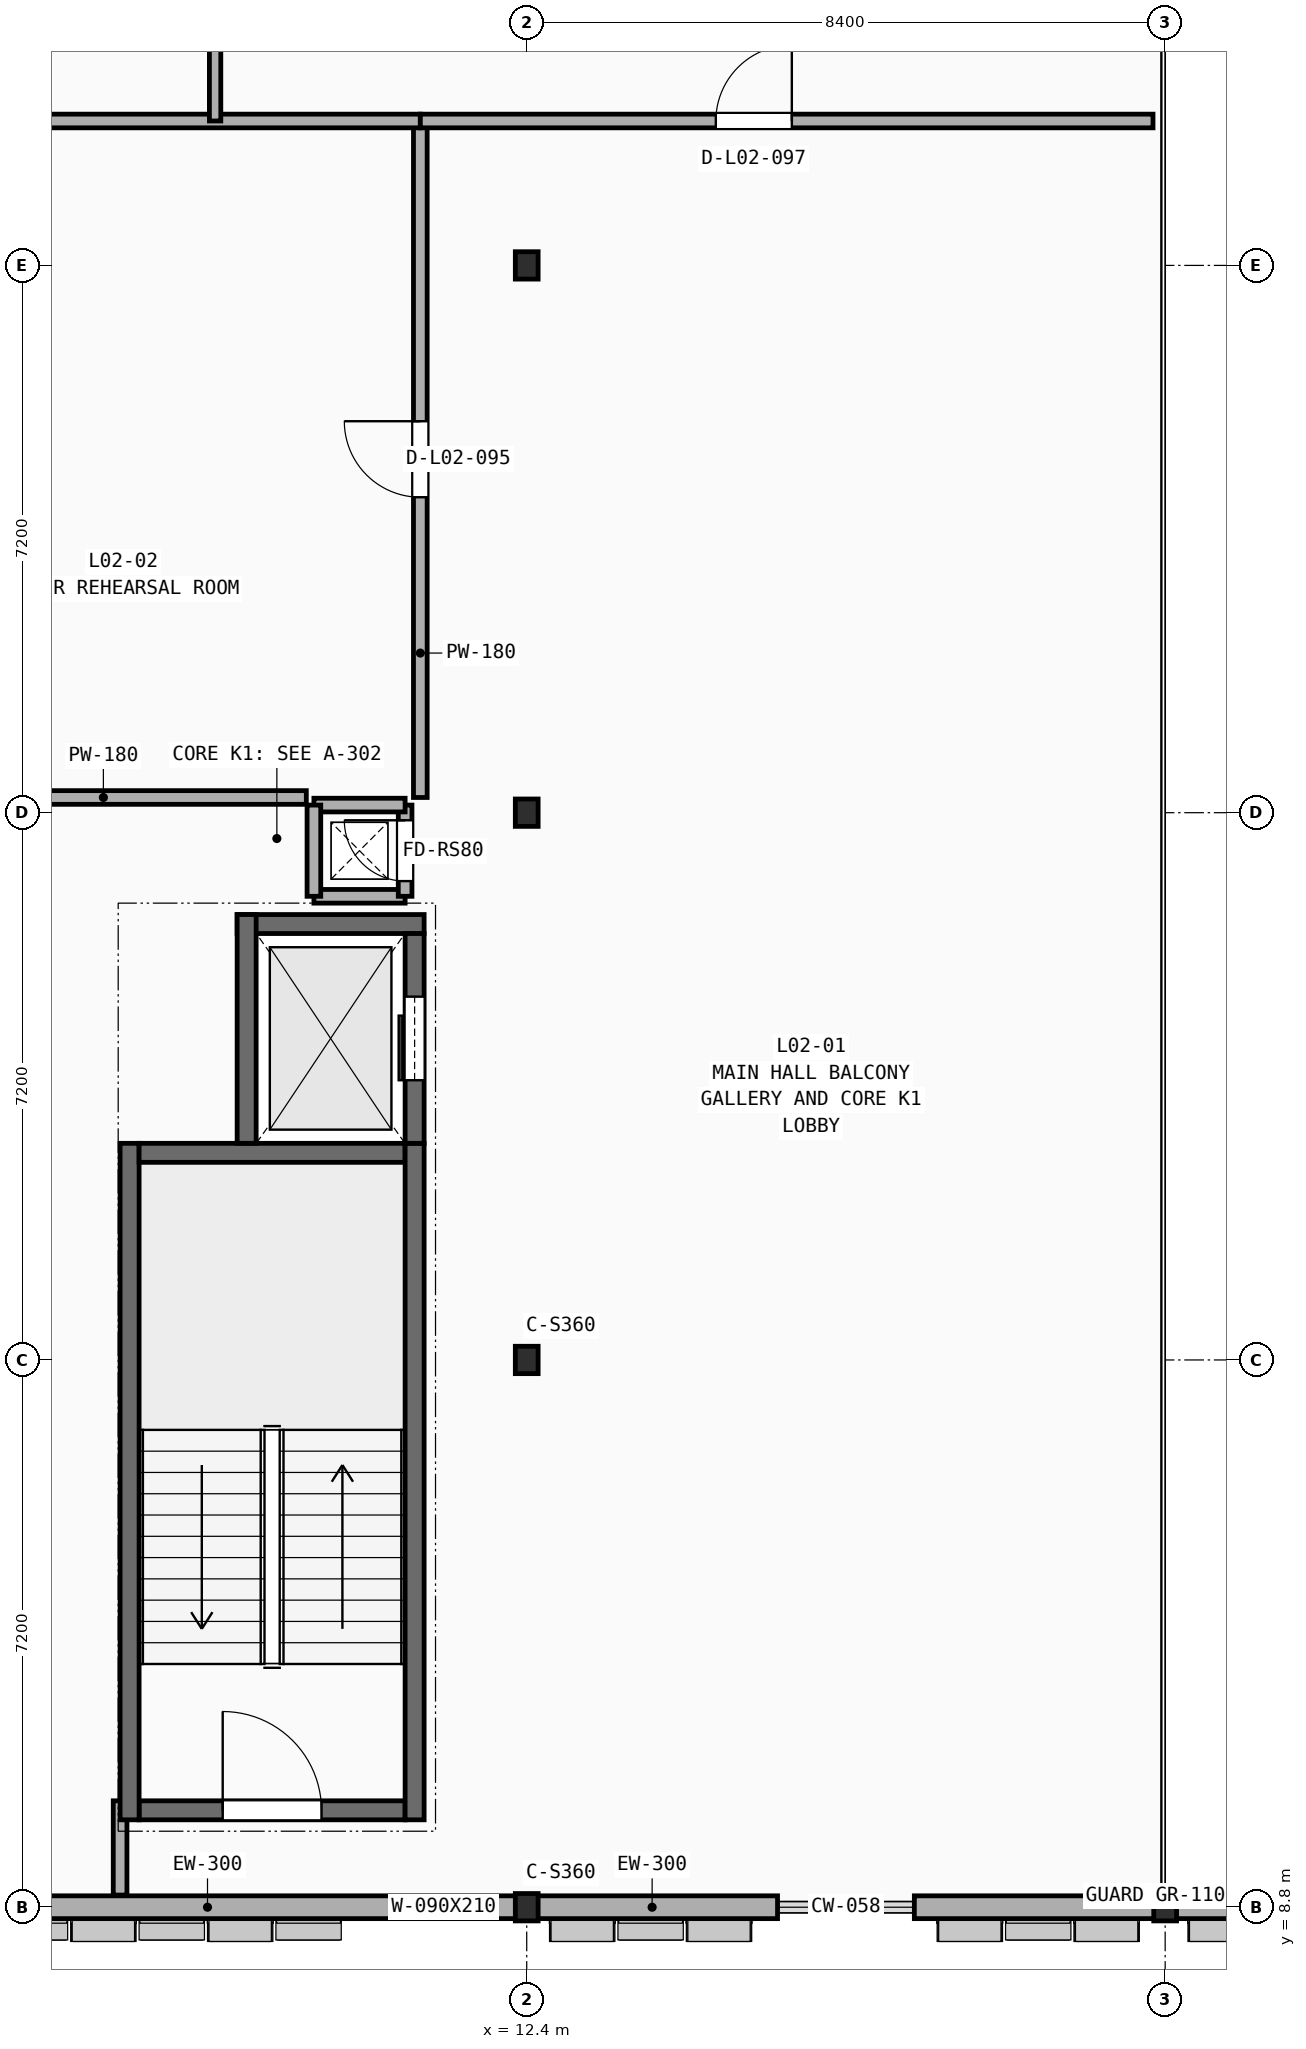
"""IFC4 building model, lengths in metres.
Left out: names, types, materials, properties, quantities, classifications, styles, units other than length and angle.
Written with IfcOpenShell. Run it as: python <this file> out.ifc"""

import sys

from ifc_helpers import new_model, si_unit, direction, frame, frame_2d, origin, origin_2d, place, context, subcontext, project, spatial, rectangle, i_section, extrude, element, fill, save


model = new_model("IFC4")
c1 = context("Model", 3, precision=1e-05, world=origin(), true_north=direction((0.0, 1.0)))
c2 = subcontext(c1, "Body", "Model", "MODEL_VIEW")
j1 = project(units=[si_unit("LENGTHUNIT", "METRE"), si_unit("PLANEANGLEUNIT", "RADIAN")], contexts=[c1])
p1 = place(None, origin())
s1 = spatial("IfcSite", under=j1, at=p1, CompositionType="ELEMENT")
p2 = place(p1, origin())
s2 = spatial("IfcBuilding", under=s1, at=p2, CompositionType="ELEMENT")
p3 = place(p2, frame((0.0, 0.0, 9.6)))
s3 = spatial("IfcBuildingStorey", under=s2, at=p3, CompositionType="ELEMENT", Elevation=9.6)
for number, where, z_axis, x_axis in (
    (1, (12.4, 8.8, 0.0), (0.0, 0.0, 1.0), (1.0, 0.0, 0.0)),
    (2, (12.4, 16.0, 0.0), (0.0, 0.0, 1.0), (1.0, 0.0, 0.0)),
    (3, (12.4, 23.2, 0.0), (0.0, 0.0, 1.0), (1.0, 0.0, 0.0)),
    (4, (12.4, 30.4, 0.0), (0.0, 0.0, 1.0), (1.0, 0.0, 0.0)),
    (5, (20.8, 8.8, 0.0), (0.0, 0.0, 1.0), (1.0, 0.0, 0.0)),
):
    element("IfcColumn", number, at=place(p3, frame(where, z_axis=z_axis, x_axis=x_axis)), inside=s3, PredefinedType="COLUMN", context=c2, shape_type="SweptSolid", body=[
        extrude(i_section(OverallWidth=0.3, OverallDepth=0.36, WebThickness=0.012, FlangeThickness=0.022, at=origin_2d()), origin(), (0.0, 0.0, 1.0), 4.2),
    ])
p4 = place(p3, frame((7.05, 8.96, 0.0), z_axis=(0.0, 0.0, 1.0), x_axis=(0.0, 1.0, 0.0)))
e6 = element("IfcWall", 6, at=p4, inside=s3, PredefinedType="PARTITIONING", context=c2, shape_type="SweptSolid", body=[
    extrude(rectangle(XDim=1.24, YDim=0.18, at=frame_2d((0.62, 0.0))), origin(), (0.0, 0.0, 1.0), 3.63),
])
p5 = place(p3, frame((4.16, 23.4, 0.0), z_axis=(0.0, 0.0, 1.0), x_axis=(1.0, 0.0, 0.0)))
e7 = element("IfcWall", 7, at=p5, inside=s3, PredefinedType="PARTITIONING", context=c2, shape_type="SweptSolid", body=[
    extrude(rectangle(XDim=5.34, YDim=0.18, at=frame_2d((2.67, 0.0))), origin(), (0.0, 0.0, 1.0), 3.63),
])
p6 = place(p3, frame((11.0, 23.4, 0.0), z_axis=(0.0, 0.0, 1.0), x_axis=(0.0, 1.0, 0.0)))
e8 = element("IfcWall", 8, at=p6, inside=s3, PredefinedType="PARTITIONING", context=c2, shape_type="SweptSolid", body=[
    extrude(rectangle(XDim=8.9, YDim=0.18, at=frame_2d((4.45, 0.0))), origin(), (0.0, 0.0, 1.0), 3.27),
])
p7 = place(p6, frame((3.95, 0.0, -0.01)))
e9 = element("IfcOpeningElement", 9, at=p7, cuts=e8, PredefinedType="OPENING", context=c2, shape_type="SweptSolid", body=[
    extrude(rectangle(XDim=1.0, YDim=2.16, at=frame_2d((0.5, 1.08))), frame((0.0, 0.1, 0.0), z_axis=(0.0, -1.0, 0.0), x_axis=(1.0, 0.0, 0.0)), (0.0, 0.0, 1.0), 0.2),
])
p8 = place(p3, frame((4.16, 32.3, 0.0), z_axis=(0.0, 0.0, 1.0), x_axis=(1.0, 0.0, 0.0)))
e10 = element("IfcWall", 10, at=p8, inside=s3, PredefinedType="PARTITIONING", context=c2, shape_type="SweptSolid", body=[
    extrude(rectangle(XDim=6.84, YDim=0.18, at=frame_2d((3.42, 0.0))), origin(), (0.0, 0.0, 1.0), 3.59),
])
p9 = place(p3, frame((8.3, 32.3, 0.0), z_axis=(0.0, 0.0, 1.0), x_axis=(0.0, 1.0, 0.0)))
e11 = element("IfcWall", 11, at=p9, inside=s3, PredefinedType="PARTITIONING", context=c2, shape_type="SweptSolid", body=[
    extrude(rectangle(XDim=5.16, YDim=0.15, at=frame_2d((2.58, 0.0))), origin(), (0.0, 0.0, 1.0), 3.63),
])
p10 = place(p9, frame((2.105, 0.0, -0.01)))
e12 = element("IfcOpeningElement", 12, at=p10, cuts=e11, PredefinedType="OPENING", context=c2, shape_type="SweptSolid", body=[
    extrude(rectangle(XDim=0.95, YDim=2.16, at=frame_2d((0.475, 1.08))), frame((0.0, 0.085, 0.0), z_axis=(0.0, -1.0, 0.0), x_axis=(1.0, 0.0, 0.0)), (0.0, 0.0, 1.0), 0.17),
])
p11 = place(p3, frame((11.0, 32.3, 0.0), z_axis=(0.0, 0.0, 1.0), x_axis=(1.0, 0.0, 0.0)))
e13 = element("IfcWall", 13, at=p11, inside=s3, PredefinedType="PARTITIONING", context=c2, shape_type="SweptSolid", body=[
    extrude(rectangle(XDim=9.64, YDim=0.18, at=frame_2d((4.82, 0.0))), origin(), (0.0, 0.0, 1.0), 3.63),
])
p12 = place(p11, frame((3.888, 0.0, -0.01)))
e14 = element("IfcOpeningElement", 14, at=p12, cuts=e13, PredefinedType="OPENING", context=c2, shape_type="SweptSolid", body=[
    extrude(rectangle(XDim=1.0, YDim=2.16, at=frame_2d((0.5, 1.08))), frame((0.0, 0.1, 0.0), z_axis=(0.0, -1.0, 0.0), x_axis=(1.0, 0.0, 0.0)), (0.0, 0.0, 1.0), 0.2),
])
p13 = place(p3, frame((4.0, 8.8, 0.0), z_axis=(0.0, 0.0, 1.0), x_axis=(1.0, 0.0, 0.0)))
e15 = element("IfcWall", 15, at=p13, inside=s3, PredefinedType="SOLIDWALL", context=c2, shape_type="SweptSolid", body=[
    extrude(rectangle(XDim=8.4, YDim=0.3, at=frame_2d((4.2, 0.0))), origin(), (0.0, 0.0, 1.0), 3.63),
])
p14 = place(p13, frame((0.46, 0.0, 0.85)))
e16 = element("IfcOpeningElement", 16, at=p14, cuts=e15, PredefinedType="OPENING", context=c2, shape_type="SweptSolid", body=[
    extrude(rectangle(XDim=0.9, YDim=2.1, at=frame_2d((0.45, 1.05))), frame((0.0, 0.16, 0.0), z_axis=(0.0, -1.0, 0.0), x_axis=(1.0, 0.0, 0.0)), (0.0, 0.0, 1.0), 0.32),
])
p15 = place(p13, frame((6.86, 0.0, 0.85)))
e17 = element("IfcOpeningElement", 17, at=p15, cuts=e15, PredefinedType="OPENING", context=c2, shape_type="SweptSolid", body=[
    extrude(rectangle(XDim=0.9, YDim=2.1, at=frame_2d((0.45, 1.05))), frame((0.0, 0.16, 0.0), z_axis=(0.0, -1.0, 0.0), x_axis=(1.0, 0.0, 0.0)), (0.0, 0.0, 1.0), 0.32),
])
for number, where, z_axis, x_axis in (
    (18, (12.4, 8.8, 0.0), (0.0, 0.0, 1.0), (1.0, 0.0, 0.0)),
    (19, (17.5, 8.8, 0.0), (0.0, 0.0, 1.0), (1.0, 0.0, 0.0)),
    (20, (20.8, 8.8, 0.0), (0.0, 0.0, 1.0), (1.0, 0.0, 0.0)),
):
    element("IfcWall", number, at=place(p3, frame(where, z_axis=z_axis, x_axis=x_axis)), inside=s3, PredefinedType="SOLIDWALL", context=c2, shape_type="SweptSolid", body=[
        extrude(rectangle(XDim=3.3, YDim=0.3, at=frame_2d((1.65, 0.0))), origin(), (0.0, 0.0, 1.0), 4.2),
    ])
p16 = place(p3, frame((7.3, 10.075, 0.0), z_axis=(0.0, 0.0, 1.0), x_axis=(1.0, 0.0, 0.0)))
e21 = element("IfcWall", 21, at=p16, inside=s3, PredefinedType="SHEAR", context=c2, shape_type="SweptSolid", body=[
    extrude(rectangle(XDim=3.5, YDim=0.25, at=frame_2d((1.75, 0.0))), origin(), (0.0, 0.0, 1.0), 4.2),
])
p17 = place(p16, frame((1.1, 0.0, -0.01)))
e22 = element("IfcOpeningElement", 22, at=p17, cuts=e21, PredefinedType="OPENING", context=c2, shape_type="SweptSolid", body=[
    extrude(rectangle(XDim=1.3, YDim=2.16, at=frame_2d((0.65, 1.08))), frame((0.0, 0.135, 0.0), z_axis=(0.0, -1.0, 0.0), x_axis=(1.0, 0.0, 0.0)), (0.0, 0.0, 1.0), 0.27),
])
p18 = place(p3, frame((7.175, 9.95, 0.0), z_axis=(0.0, 0.0, 1.0), x_axis=(0.0, 1.0, 0.0)))
e23 = element("IfcWall", 23, at=p18, inside=s3, PredefinedType="SHEAR", context=c2, shape_type="SweptSolid", body=[
    extrude(rectangle(XDim=8.9, YDim=0.25, at=frame_2d((4.45, 0.0))), origin(), (0.0, 0.0, 1.0), 4.2),
])
p19 = place(p3, frame((10.8, 18.725, 0.0), z_axis=(0.0, 0.0, 1.0), x_axis=(-1.0, 0.0, 0.0)))
e24 = element("IfcWall", 24, at=p19, inside=s3, PredefinedType="SHEAR", context=c2, shape_type="SweptSolid", body=[
    extrude(rectangle(XDim=3.5, YDim=0.25, at=frame_2d((1.75, 0.0))), origin(), (0.0, 0.0, 1.0), 4.2),
])
p20 = place(p3, frame((10.925, 9.95, 0.0), z_axis=(0.0, 0.0, 1.0), x_axis=(0.0, 1.0, 0.0)))
e25 = element("IfcWall", 25, at=p20, inside=s3, PredefinedType="SHEAR", context=c2, shape_type="SweptSolid", body=[
    extrude(rectangle(XDim=8.9, YDim=0.25, at=frame_2d((4.45, 0.0))), origin(), (0.0, 0.0, 1.0), 4.2),
])
p21 = place(p3, frame((8.59, 21.735, 0.0), z_axis=(0.0, 0.0, 1.0), x_axis=(1.0, 0.0, 0.0)))
e26 = element("IfcWall", 26, at=p21, inside=s3, PredefinedType="SHEAR", context=c2, shape_type="SweptSolid", body=[
    extrude(rectangle(XDim=2.46, YDim=0.25, at=frame_2d((1.23, 0.0))), origin(), (0.0, 0.0, 1.0), 4.2),
])
p22 = place(p3, frame((10.925, 18.85, 0.0), z_axis=(0.0, 0.0, 1.0), x_axis=(0.0, 1.0, 0.0)))
e27 = element("IfcWall", 27, at=p22, inside=s3, PredefinedType="SHEAR", context=c2, shape_type="SweptSolid", body=[
    extrude(rectangle(XDim=2.76, YDim=0.25, at=frame_2d((1.38, 0.0))), origin(), (0.0, 0.0, 1.0), 4.2),
])
p23 = place(p22, frame((0.83, 0.0, -0.01)))
e28 = element("IfcOpeningElement", 28, at=p23, cuts=e27, PredefinedType="OPENING", context=c2, shape_type="SweptSolid", body=[
    extrude(rectangle(XDim=1.1, YDim=2.16, at=frame_2d((0.55, 1.08))), frame((0.0, 0.135, 0.0), z_axis=(0.0, -1.0, 0.0), x_axis=(1.0, 0.0, 0.0)), (0.0, 0.0, 1.0), 0.27),
])
p24 = place(p3, frame((8.715, 18.85, 0.0), z_axis=(0.0, 0.0, 1.0), x_axis=(0.0, 1.0, 0.0)))
e29 = element("IfcWall", 29, at=p24, inside=s3, PredefinedType="SHEAR", context=c2, shape_type="SweptSolid", body=[
    extrude(rectangle(XDim=3.01, YDim=0.25, at=frame_2d((1.505, 0.0))), origin(), (0.0, 0.0, 1.0), 4.2),
])
p25 = place(p3, frame((9.6, 22.1, 0.0), z_axis=(0.0, 0.0, 1.0), x_axis=(1.0, 0.0, 0.0)))
e30 = element("IfcWall", 30, at=p25, inside=s3, PredefinedType="SOLIDWALL", context=c2, shape_type="SweptSolid", body=[
    extrude(rectangle(XDim=1.2, YDim=0.18, at=frame_2d((0.6, 0.0))), origin(), (0.0, 0.0, 1.0), 3.97),
])
p26 = place(p3, frame((10.8, 22.1, 0.0), z_axis=(0.0, 0.0, 1.0), x_axis=(0.0, 1.0, 0.0)))
e31 = element("IfcWall", 31, at=p26, inside=s3, PredefinedType="SOLIDWALL", context=c2, shape_type="SweptSolid", body=[
    extrude(rectangle(XDim=1.2, YDim=0.18, at=frame_2d((0.6, 0.0))), origin(), (0.0, 0.0, 1.0), 3.97),
])
p27 = place(p26, frame((0.2, 0.0, -0.01)))
e32 = element("IfcOpeningElement", 32, at=p27, cuts=e31, PredefinedType="OPENING", context=c2, shape_type="SweptSolid", body=[
    extrude(rectangle(XDim=0.8, YDim=2.06, at=frame_2d((0.4, 1.03))), frame((0.0, 0.1, 0.0), z_axis=(0.0, -1.0, 0.0), x_axis=(1.0, 0.0, 0.0)), (0.0, 0.0, 1.0), 0.2),
])
for number, where, z_axis, x_axis in (
    (33, (10.8, 23.3, 0.0), (0.0, 0.0, 1.0), (-1.0, 0.0, 0.0)),
    (34, (9.6, 23.3, 0.0), (0.0, 0.0, 1.0), (0.0, -1.0, 0.0)),
):
    element("IfcWall", number, at=place(p3, frame(where, z_axis=z_axis, x_axis=x_axis)), inside=s3, PredefinedType="SOLIDWALL", context=c2, shape_type="SweptSolid", body=[
        extrude(rectangle(XDim=1.2, YDim=0.18, at=frame_2d((0.6, 0.0))), origin(), (0.0, 0.0, 1.0), 3.97),
    ])
p28 = place(p7, frame((0.0, 0.0, 0.01)))
e35 = element("IfcDoor", 35, at=p28, inside=s3, OperationType="SINGLE_SWING_RIGHT", PredefinedType="DOOR", context=c2, shape_type="SweptSolid", body=[
    extrude(rectangle(XDim=1.0, YDim=2.15, at=frame_2d((0.5, 1.075))), frame((0.0, 0.025, 0.0), z_axis=(0.0, -1.0, 0.0), x_axis=(1.0, 0.0, 0.0)), (0.0, 0.0, 1.0), 0.05),
])
fill(e9, e35)
p29 = place(p12, frame((0.0, 0.0, 0.01)))
e36 = element("IfcDoor", 36, at=p29, inside=s3, OperationType="SINGLE_SWING_RIGHT", PredefinedType="DOOR", context=c2, shape_type="SweptSolid", body=[
    extrude(rectangle(XDim=1.0, YDim=2.15, at=frame_2d((0.5, 1.075))), frame((0.0, 0.025, 0.0), z_axis=(0.0, -1.0, 0.0), x_axis=(1.0, 0.0, 0.0)), (0.0, 0.0, 1.0), 0.05),
])
fill(e14, e36)
p30 = place(p15, origin())
e37 = element("IfcWindow", 37, at=p30, inside=s3, PartitioningType="SINGLE_PANEL", PredefinedType="WINDOW", context=c2, shape_type="SweptSolid", body=[
    extrude(rectangle(XDim=0.9, YDim=2.1, at=frame_2d((0.45, 1.05))), frame((0.0, 0.03, 0.0), z_axis=(0.0, -1.0, 0.0), x_axis=(1.0, 0.0, 0.0)), (0.0, 0.0, 1.0), 0.06),
])
fill(e17, e37)
p31 = place(p17, frame((1.3, 0.0, 0.01), z_axis=(0.0, 0.0, 1.0), x_axis=(-1.0, 0.0, 0.0)))
e38 = element("IfcDoor", 38, at=p31, inside=s3, OperationType="SINGLE_SWING_LEFT", PredefinedType="DOOR", context=c2, shape_type="SweptSolid", body=[
    extrude(rectangle(XDim=1.3, YDim=2.15, at=frame_2d((0.65, 1.075))), frame((0.0, 0.025, 0.0), z_axis=(0.0, -1.0, 0.0), x_axis=(1.0, 0.0, 0.0)), (0.0, 0.0, 1.0), 0.05),
])
fill(e22, e38)
p32 = place(p23, frame((0.0, 0.0, 0.01)))
e39 = element("IfcDoor", 39, at=p32, inside=s3, OperationType="SLIDING_TO_LEFT", PredefinedType="DOOR", context=c2, shape_type="SweptSolid", body=[
    extrude(rectangle(XDim=1.1, YDim=2.15, at=frame_2d((0.55, 1.075))), frame((0.0, 0.025, 0.0), z_axis=(0.0, -1.0, 0.0), x_axis=(1.0, 0.0, 0.0)), (0.0, 0.0, 1.0), 0.05),
])
fill(e28, e39)
p33 = place(p27, frame((0.0, 0.0, 0.01)))
e40 = element("IfcDoor", 40, at=p33, inside=s3, OperationType="SINGLE_SWING_RIGHT", PredefinedType="DOOR", context=c2, shape_type="SweptSolid", body=[
    extrude(rectangle(XDim=0.8, YDim=2.05, at=frame_2d((0.4, 1.025))), frame((0.0, 0.025, 0.0), z_axis=(0.0, -1.0, 0.0), x_axis=(1.0, 0.0, 0.0)), (0.0, 0.0, 1.0), 0.05),
])
fill(e32, e40)
save(model, sys.argv[1])
